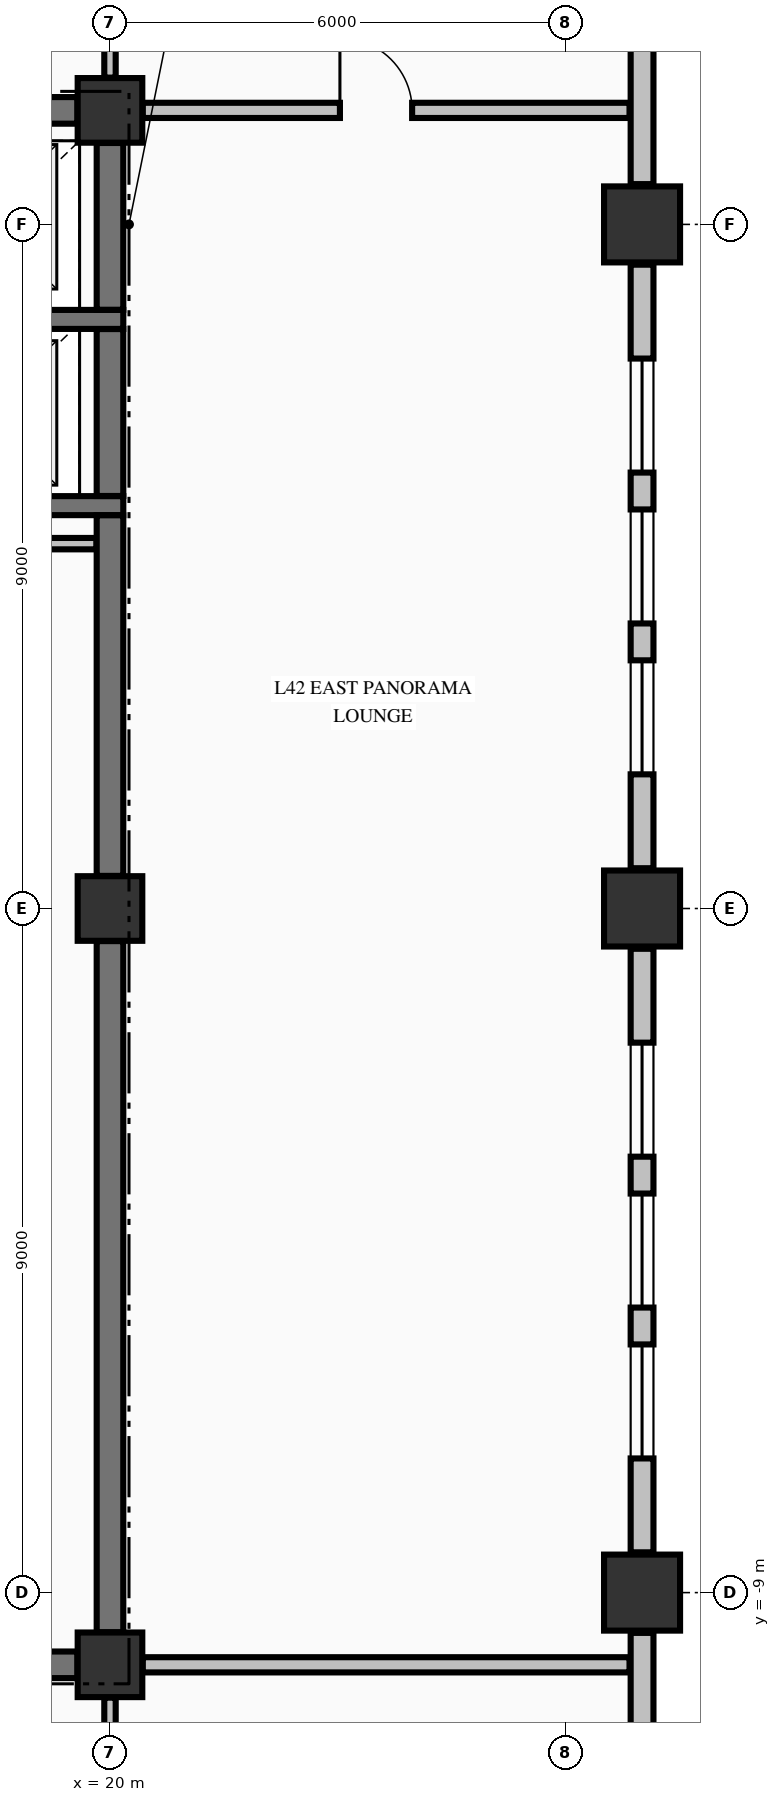
"""IFC4 building model, lengths in metres.
Left out: names, types, materials, properties, quantities, classifications, styles, units other than length and angle.
Written with IfcOpenShell. Run it as: python <this file> out.ifc"""

import sys

from ifc_helpers import new_model, si_unit, direction, frame, frame_2d, origin, origin_2d, place, context, subcontext, project, spatial, rectangle, extrude, element, fill, save


model = new_model("IFC4")
c1 = context("Model", 3, precision=1e-05, world=origin(), true_north=direction((0.0, 1.0)))
c2 = subcontext(c1, "Body", "Model", "MODEL_VIEW")
j1 = project(units=[si_unit("LENGTHUNIT", "METRE"), si_unit("PLANEANGLEUNIT", "RADIAN")], contexts=[c1])
p1 = place(None, origin())
s1 = spatial("IfcSite", under=j1, at=p1, CompositionType="ELEMENT")
p2 = place(p1, origin())
s2 = spatial("IfcBuilding", under=s1, at=p2, CompositionType="ELEMENT")
p3 = place(p2, frame((0.0, 0.0, 166.06)))
s3 = spatial("IfcBuildingStorey", under=s2, at=p3, CompositionType="ELEMENT", Elevation=166.06)
for number, where, z_axis, x_axis in (
    (1, (27.0, -9.0, -0.25), (0.0, 0.0, 1.0), (1.0, 0.0, 0.0)),
    (2, (27.0, 0.0, -0.25), (0.0, 0.0, 1.0), (1.0, 0.0, 0.0)),
    (3, (27.0, 9.0, -0.25), (0.0, 0.0, 1.0), (1.0, 0.0, 0.0)),
):
    element("IfcColumn", number, at=place(p3, frame(where, z_axis=z_axis, x_axis=x_axis)), inside=s3, PredefinedType="COLUMN", context=c2, shape_type="SweptSolid", body=[
        extrude(rectangle(XDim=1.0, YDim=1.0, at=origin_2d()), origin(), (0.0, 0.0, 1.0), 3.4),
    ])
for number, where, z_axis, x_axis in (
    (4, (20.0, -9.95, -0.25), (0.0, 0.0, 1.0), (1.0, 0.0, 0.0)),
    (5, (20.0, 10.5, -0.25), (0.0, 0.0, 1.0), (1.0, 0.0, 0.0)),
    (6, (20.0, 0.0, -0.25), (0.0, 0.0, 1.0), (1.0, 0.0, 0.0)),
):
    element("IfcColumn", number, at=place(p3, frame(where, z_axis=z_axis, x_axis=x_axis)), inside=s3, PredefinedType="COLUMN", context=c2, shape_type="SweptSolid", body=[
        extrude(rectangle(XDim=0.85, YDim=0.85, at=origin_2d()), origin(), (0.0, 0.0, 1.0), 3.4),
    ])
p4 = place(p3, frame((27.0, -18.97, 0.0), z_axis=(0.0, 0.0, 1.0), x_axis=(0.0, 1.0, 0.0)))
e7 = element("IfcWall", 7, at=p4, inside=s3, PredefinedType="STANDARD", context=c2, shape_type="SweptSolid", body=[
    extrude(rectangle(XDim=9.44, YDim=0.3, at=frame_2d((4.72, 0.0))), origin(), (0.0, 0.0, 1.0), 2.542),
])
p5 = place(p3, frame((27.0, -8.47, 0.0), z_axis=(0.0, 0.0, 1.0), x_axis=(0.0, 1.0, 0.0)))
e8 = element("IfcWall", 8, at=p5, inside=s3, PredefinedType="STANDARD", context=c2, shape_type="SweptSolid", body=[
    extrude(rectangle(XDim=7.94, YDim=0.3, at=frame_2d((3.97, 0.0))), origin(), (0.0, 0.0, 1.0), 2.542),
])
p6 = place(p5, frame((1.235, 0.0, 0.72)))
e9 = element("IfcOpeningElement", 9, at=p6, cuts=e8, PredefinedType="OPENING", context=c2, shape_type="SweptSolid", body=[
    extrude(rectangle(XDim=1.5, YDim=1.6, at=frame_2d((0.75, 0.8))), frame((0.0, 0.16, 0.0), z_axis=(0.0, -1.0, 0.0), x_axis=(1.0, 0.0, 0.0)), (0.0, 0.0, 1.0), 0.32),
])
p7 = place(p5, frame((3.22, 0.0, 0.72)))
e10 = element("IfcOpeningElement", 10, at=p7, cuts=e8, PredefinedType="OPENING", context=c2, shape_type="SweptSolid", body=[
    extrude(rectangle(XDim=1.5, YDim=1.6, at=frame_2d((0.75, 0.8))), frame((0.0, 0.16, 0.0), z_axis=(0.0, -1.0, 0.0), x_axis=(1.0, 0.0, 0.0)), (0.0, 0.0, 1.0), 0.32),
])
p8 = place(p5, frame((5.205, 0.0, 0.72)))
e11 = element("IfcOpeningElement", 11, at=p8, cuts=e8, PredefinedType="OPENING", context=c2, shape_type="SweptSolid", body=[
    extrude(rectangle(XDim=1.5, YDim=1.6, at=frame_2d((0.75, 0.8))), frame((0.0, 0.16, 0.0), z_axis=(0.0, -1.0, 0.0), x_axis=(1.0, 0.0, 0.0)), (0.0, 0.0, 1.0), 0.32),
])
p9 = place(p3, frame((27.0, 0.53, 0.0), z_axis=(0.0, 0.0, 1.0), x_axis=(0.0, 1.0, 0.0)))
e12 = element("IfcWall", 12, at=p9, inside=s3, PredefinedType="STANDARD", context=c2, shape_type="SweptSolid", body=[
    extrude(rectangle(XDim=7.94, YDim=0.3, at=frame_2d((3.97, 0.0))), origin(), (0.0, 0.0, 1.0), 2.542),
])
p10 = place(p9, frame((1.235, 0.0, 0.72)))
e13 = element("IfcOpeningElement", 13, at=p10, cuts=e12, PredefinedType="OPENING", context=c2, shape_type="SweptSolid", body=[
    extrude(rectangle(XDim=1.5, YDim=1.6, at=frame_2d((0.75, 0.8))), frame((0.0, 0.16, 0.0), z_axis=(0.0, -1.0, 0.0), x_axis=(1.0, 0.0, 0.0)), (0.0, 0.0, 1.0), 0.32),
])
p11 = place(p9, frame((3.22, 0.0, 0.72)))
e14 = element("IfcOpeningElement", 14, at=p11, cuts=e12, PredefinedType="OPENING", context=c2, shape_type="SweptSolid", body=[
    extrude(rectangle(XDim=1.5, YDim=1.6, at=frame_2d((0.75, 0.8))), frame((0.0, 0.16, 0.0), z_axis=(0.0, -1.0, 0.0), x_axis=(1.0, 0.0, 0.0)), (0.0, 0.0, 1.0), 0.32),
])
p12 = place(p9, frame((5.205, 0.0, 0.72)))
e15 = element("IfcOpeningElement", 15, at=p12, cuts=e12, PredefinedType="OPENING", context=c2, shape_type="SweptSolid", body=[
    extrude(rectangle(XDim=1.5, YDim=1.6, at=frame_2d((0.75, 0.8))), frame((0.0, 0.16, 0.0), z_axis=(0.0, -1.0, 0.0), x_axis=(1.0, 0.0, 0.0)), (0.0, 0.0, 1.0), 0.32),
])
p13 = place(p3, frame((27.0, 9.53, 0.0), z_axis=(0.0, 0.0, 1.0), x_axis=(0.0, 1.0, 0.0)))
e16 = element("IfcWall", 16, at=p13, inside=s3, PredefinedType="STANDARD", context=c2, shape_type="SweptSolid", body=[
    extrude(rectangle(XDim=9.44, YDim=0.3, at=frame_2d((4.72, 0.0))), origin(), (0.0, 0.0, 1.0), 2.542),
])
p14 = place(p3, frame((14.7, -9.95, 0.0), z_axis=(0.0, 0.0, 1.0), x_axis=(1.0, 0.0, 0.0)))
e17 = element("IfcWall", 17, at=p14, inside=s3, PredefinedType="SHEAR", context=c2, shape_type="SweptSolid", body=[
    extrude(rectangle(XDim=4.871, YDim=0.35, at=frame_2d((2.436, 0.0))), origin(), (0.0, 0.0, 1.0), 3.15),
])
p15 = place(p14, frame((2.125, 0.0, 0.0)))
e18 = element("IfcOpeningElement", 18, at=p15, cuts=e17, PredefinedType="OPENING", context=c2, shape_type="SweptSolid", body=[
    extrude(rectangle(XDim=1.05, YDim=2.15, at=frame_2d((0.525, 1.075))), frame((0.0, 0.185, 0.0), z_axis=(0.0, -1.0, 0.0), x_axis=(1.0, 0.0, 0.0)), (0.0, 0.0, 1.0), 0.37),
])
for number, where, z_axis, x_axis in (
    (19, (17.025, 5.3, 0.0), (0.0, 0.0, 1.0), (1.0, 0.0, 0.0)),
    (20, (17.025, 7.75, 0.0), (0.0, 0.0, 1.0), (1.0, 0.0, 0.0)),
):
    element("IfcWall", number, at=place(p3, frame(where, z_axis=z_axis, x_axis=x_axis)), inside=s3, PredefinedType="SOLIDWALL", context=c2, shape_type="SweptSolid", body=[
        extrude(rectangle(XDim=3.15, YDim=0.25, at=frame_2d((1.575, 0.0))), origin(), (0.0, 0.0, 1.0), 3.15),
    ])
p16 = place(p3, frame((14.7, 10.5, 0.0), z_axis=(0.0, 0.0, 1.0), x_axis=(1.0, 0.0, 0.0)))
e21 = element("IfcWall", 21, at=p16, inside=s3, PredefinedType="SHEAR", context=c2, shape_type="SweptSolid", body=[
    extrude(rectangle(XDim=4.871, YDim=0.35, at=frame_2d((2.436, 0.0))), origin(), (0.0, 0.0, 1.0), 3.15),
])
p17 = place(p16, frame((0.7, 0.0, 0.0)))
e22 = element("IfcOpeningElement", 22, at=p17, cuts=e21, PredefinedType="OPENING", context=c2, shape_type="SweptSolid", body=[
    extrude(rectangle(XDim=1.1, YDim=2.15, at=frame_2d((0.55, 1.075))), frame((0.0, 0.185, 0.0), z_axis=(0.0, -1.0, 0.0), x_axis=(1.0, 0.0, 0.0)), (0.0, 0.0, 1.0), 0.37),
])
p18 = place(p3, frame((20.431, -9.95, 0.0), z_axis=(0.0, 0.0, 1.0), x_axis=(1.0, 0.0, 0.0)))
e23 = element("IfcWall", 23, at=p18, inside=s3, PredefinedType="PARTITIONING", context=c2, shape_type="SweptSolid", body=[
    extrude(rectangle(XDim=6.404, YDim=0.2, at=frame_2d((3.202, 0.0))), origin(), (0.0, 0.0, 1.0), 3.15),
])
p19 = place(p3, frame((14.878, 4.8, 0.0), z_axis=(0.0, 0.0, 1.0), x_axis=(1.0, 0.0, 0.0)))
e24 = element("IfcWall", 24, at=p19, inside=s3, PredefinedType="PARTITIONING", context=c2, shape_type="SweptSolid", body=[
    extrude(rectangle(XDim=4.944, YDim=0.15, at=frame_2d((2.472, 0.0))), origin(), (0.0, 0.0, 1.0), 3.15),
])
p20 = place(p3, frame((20.431, 10.5, 0.0), z_axis=(0.0, 0.0, 1.0), x_axis=(1.0, 0.0, 0.0)))
e25 = element("IfcWall", 25, at=p20, inside=s3, PredefinedType="PARTITIONING", context=c2, shape_type="SweptSolid", body=[
    extrude(rectangle(XDim=6.404, YDim=0.2, at=frame_2d((3.202, 0.0))), origin(), (0.0, 0.0, 1.0), 3.15),
])
p21 = place(p20, frame((2.594, 0.0, 0.0)))
e26 = element("IfcOpeningElement", 26, at=p21, cuts=e25, PredefinedType="OPENING", context=c2, shape_type="SweptSolid", body=[
    extrude(rectangle(XDim=0.95, YDim=2.15, at=frame_2d((0.475, 1.075))), frame((0.0, 0.11, 0.0), z_axis=(0.0, -1.0, 0.0), x_axis=(1.0, 0.0, 0.0)), (0.0, 0.0, 1.0), 0.22),
])
p22 = place(p3, frame((20.0, -9.521, 0.0), z_axis=(0.0, 0.0, 1.0), x_axis=(0.0, 1.0, 0.0)))
e27 = element("IfcWall", 27, at=p22, inside=s3, PredefinedType="SHEAR", context=c2, shape_type="SweptSolid", body=[
    extrude(rectangle(XDim=9.092, YDim=0.35, at=frame_2d((4.546, 0.0))), origin(), (0.0, 0.0, 1.0), 3.15),
])
p23 = place(p3, frame((20.0, 0.429, 0.0), z_axis=(0.0, 0.0, 1.0), x_axis=(0.0, 1.0, 0.0)))
e28 = element("IfcWall", 28, at=p23, inside=s3, PredefinedType="SHEAR", context=c2, shape_type="SweptSolid", body=[
    extrude(rectangle(XDim=4.744, YDim=0.35, at=frame_2d((2.372, 0.0))), origin(), (0.0, 0.0, 1.0), 3.15),
])
p24 = place(p3, frame((20.0, 5.427, 0.0), z_axis=(0.0, 0.0, 1.0), x_axis=(0.0, 1.0, 0.0)))
e29 = element("IfcWall", 29, at=p24, inside=s3, PredefinedType="SHEAR", context=c2, shape_type="SweptSolid", body=[
    extrude(rectangle(XDim=2.196, YDim=0.35, at=frame_2d((1.098, 0.0))), origin(), (0.0, 0.0, 1.0), 3.15),
])
p25 = place(p3, frame((20.0, 7.877, 0.0), z_axis=(0.0, 0.0, 1.0), x_axis=(0.0, 1.0, 0.0)))
e30 = element("IfcWall", 30, at=p25, inside=s3, PredefinedType="SHEAR", context=c2, shape_type="SweptSolid", body=[
    extrude(rectangle(XDim=2.194, YDim=0.35, at=frame_2d((1.097, 0.0))), origin(), (0.0, 0.0, 1.0), 3.15),
])
p26 = place(p3, frame((20.0, -12.197, 0.0), z_axis=(0.0, 0.0, 1.0), x_axis=(0.0, 1.0, 0.0)))
e31 = element("IfcWall", 31, at=p26, inside=s3, PredefinedType="PARTITIONING", context=c2, shape_type="SweptSolid", body=[
    extrude(rectangle(XDim=1.816, YDim=0.15, at=frame_2d((0.908, 0.0))), origin(), (0.0, 0.0, 1.0), 2.342),
])
p27 = place(p3, frame((20.0, 10.931, 0.0), z_axis=(0.0, 0.0, 1.0), x_axis=(0.0, 1.0, 0.0)))
e32 = element("IfcWall", 32, at=p27, inside=s3, PredefinedType="PARTITIONING", context=c2, shape_type="SweptSolid", body=[
    extrude(rectangle(XDim=2.116, YDim=0.15, at=frame_2d((1.058, 0.0))), origin(), (0.0, 0.0, 1.0), 2.342),
])
p28 = place(p27, frame((0.414, 0.0, 0.0)))
e33 = element("IfcOpeningElement", 33, at=p28, cuts=e32, PredefinedType="OPENING", context=c2, shape_type="SweptSolid", body=[
    extrude(rectangle(XDim=0.95, YDim=2.15, at=frame_2d((0.475, 1.075))), frame((0.0, 0.085, 0.0), z_axis=(0.0, -1.0, 0.0), x_axis=(1.0, 0.0, 0.0)), (0.0, 0.0, 1.0), 0.17),
])
p29 = place(p6, origin())
e34 = element("IfcWindow", 34, at=p29, inside=s3, PartitioningType="SINGLE_PANEL", PredefinedType="WINDOW", context=c2, shape_type="SweptSolid", body=[
    extrude(rectangle(XDim=1.5, YDim=1.6, at=frame_2d((0.75, 0.8))), frame((0.0, 0.03, 0.0), z_axis=(0.0, -1.0, 0.0), x_axis=(1.0, 0.0, 0.0)), (0.0, 0.0, 1.0), 0.06),
])
fill(e9, e34)
p30 = place(p7, origin())
e35 = element("IfcWindow", 35, at=p30, inside=s3, PartitioningType="SINGLE_PANEL", PredefinedType="WINDOW", context=c2, shape_type="SweptSolid", body=[
    extrude(rectangle(XDim=1.5, YDim=1.6, at=frame_2d((0.75, 0.8))), frame((0.0, 0.03, 0.0), z_axis=(0.0, -1.0, 0.0), x_axis=(1.0, 0.0, 0.0)), (0.0, 0.0, 1.0), 0.06),
])
fill(e10, e35)
p31 = place(p8, origin())
e36 = element("IfcWindow", 36, at=p31, inside=s3, PartitioningType="SINGLE_PANEL", PredefinedType="WINDOW", context=c2, shape_type="SweptSolid", body=[
    extrude(rectangle(XDim=1.5, YDim=1.6, at=frame_2d((0.75, 0.8))), frame((0.0, 0.03, 0.0), z_axis=(0.0, -1.0, 0.0), x_axis=(1.0, 0.0, 0.0)), (0.0, 0.0, 1.0), 0.06),
])
fill(e11, e36)
p32 = place(p10, origin())
e37 = element("IfcWindow", 37, at=p32, inside=s3, PartitioningType="SINGLE_PANEL", PredefinedType="WINDOW", context=c2, shape_type="SweptSolid", body=[
    extrude(rectangle(XDim=1.5, YDim=1.6, at=frame_2d((0.75, 0.8))), frame((0.0, 0.03, 0.0), z_axis=(0.0, -1.0, 0.0), x_axis=(1.0, 0.0, 0.0)), (0.0, 0.0, 1.0), 0.06),
])
fill(e13, e37)
p33 = place(p11, origin())
e38 = element("IfcWindow", 38, at=p33, inside=s3, PartitioningType="SINGLE_PANEL", PredefinedType="WINDOW", context=c2, shape_type="SweptSolid", body=[
    extrude(rectangle(XDim=1.5, YDim=1.6, at=frame_2d((0.75, 0.8))), frame((0.0, 0.03, 0.0), z_axis=(0.0, -1.0, 0.0), x_axis=(1.0, 0.0, 0.0)), (0.0, 0.0, 1.0), 0.06),
])
fill(e14, e38)
p34 = place(p12, origin())
e39 = element("IfcWindow", 39, at=p34, inside=s3, PartitioningType="SINGLE_PANEL", PredefinedType="WINDOW", context=c2, shape_type="SweptSolid", body=[
    extrude(rectangle(XDim=1.5, YDim=1.6, at=frame_2d((0.75, 0.8))), frame((0.0, 0.03, 0.0), z_axis=(0.0, -1.0, 0.0), x_axis=(1.0, 0.0, 0.0)), (0.0, 0.0, 1.0), 0.06),
])
fill(e15, e39)
p35 = place(p21, origin())
e40 = element("IfcDoor", 40, at=p35, inside=s3, OperationType="SINGLE_SWING_LEFT", PredefinedType="DOOR", context=c2, shape_type="SweptSolid", body=[
    extrude(rectangle(XDim=0.95, YDim=2.15, at=frame_2d((0.475, 1.075))), frame((0.0, 0.025, 0.0), z_axis=(0.0, -1.0, 0.0), x_axis=(1.0, 0.0, 0.0)), (0.0, 0.0, 1.0), 0.05),
])
fill(e26, e40)
save(model, sys.argv[1])
